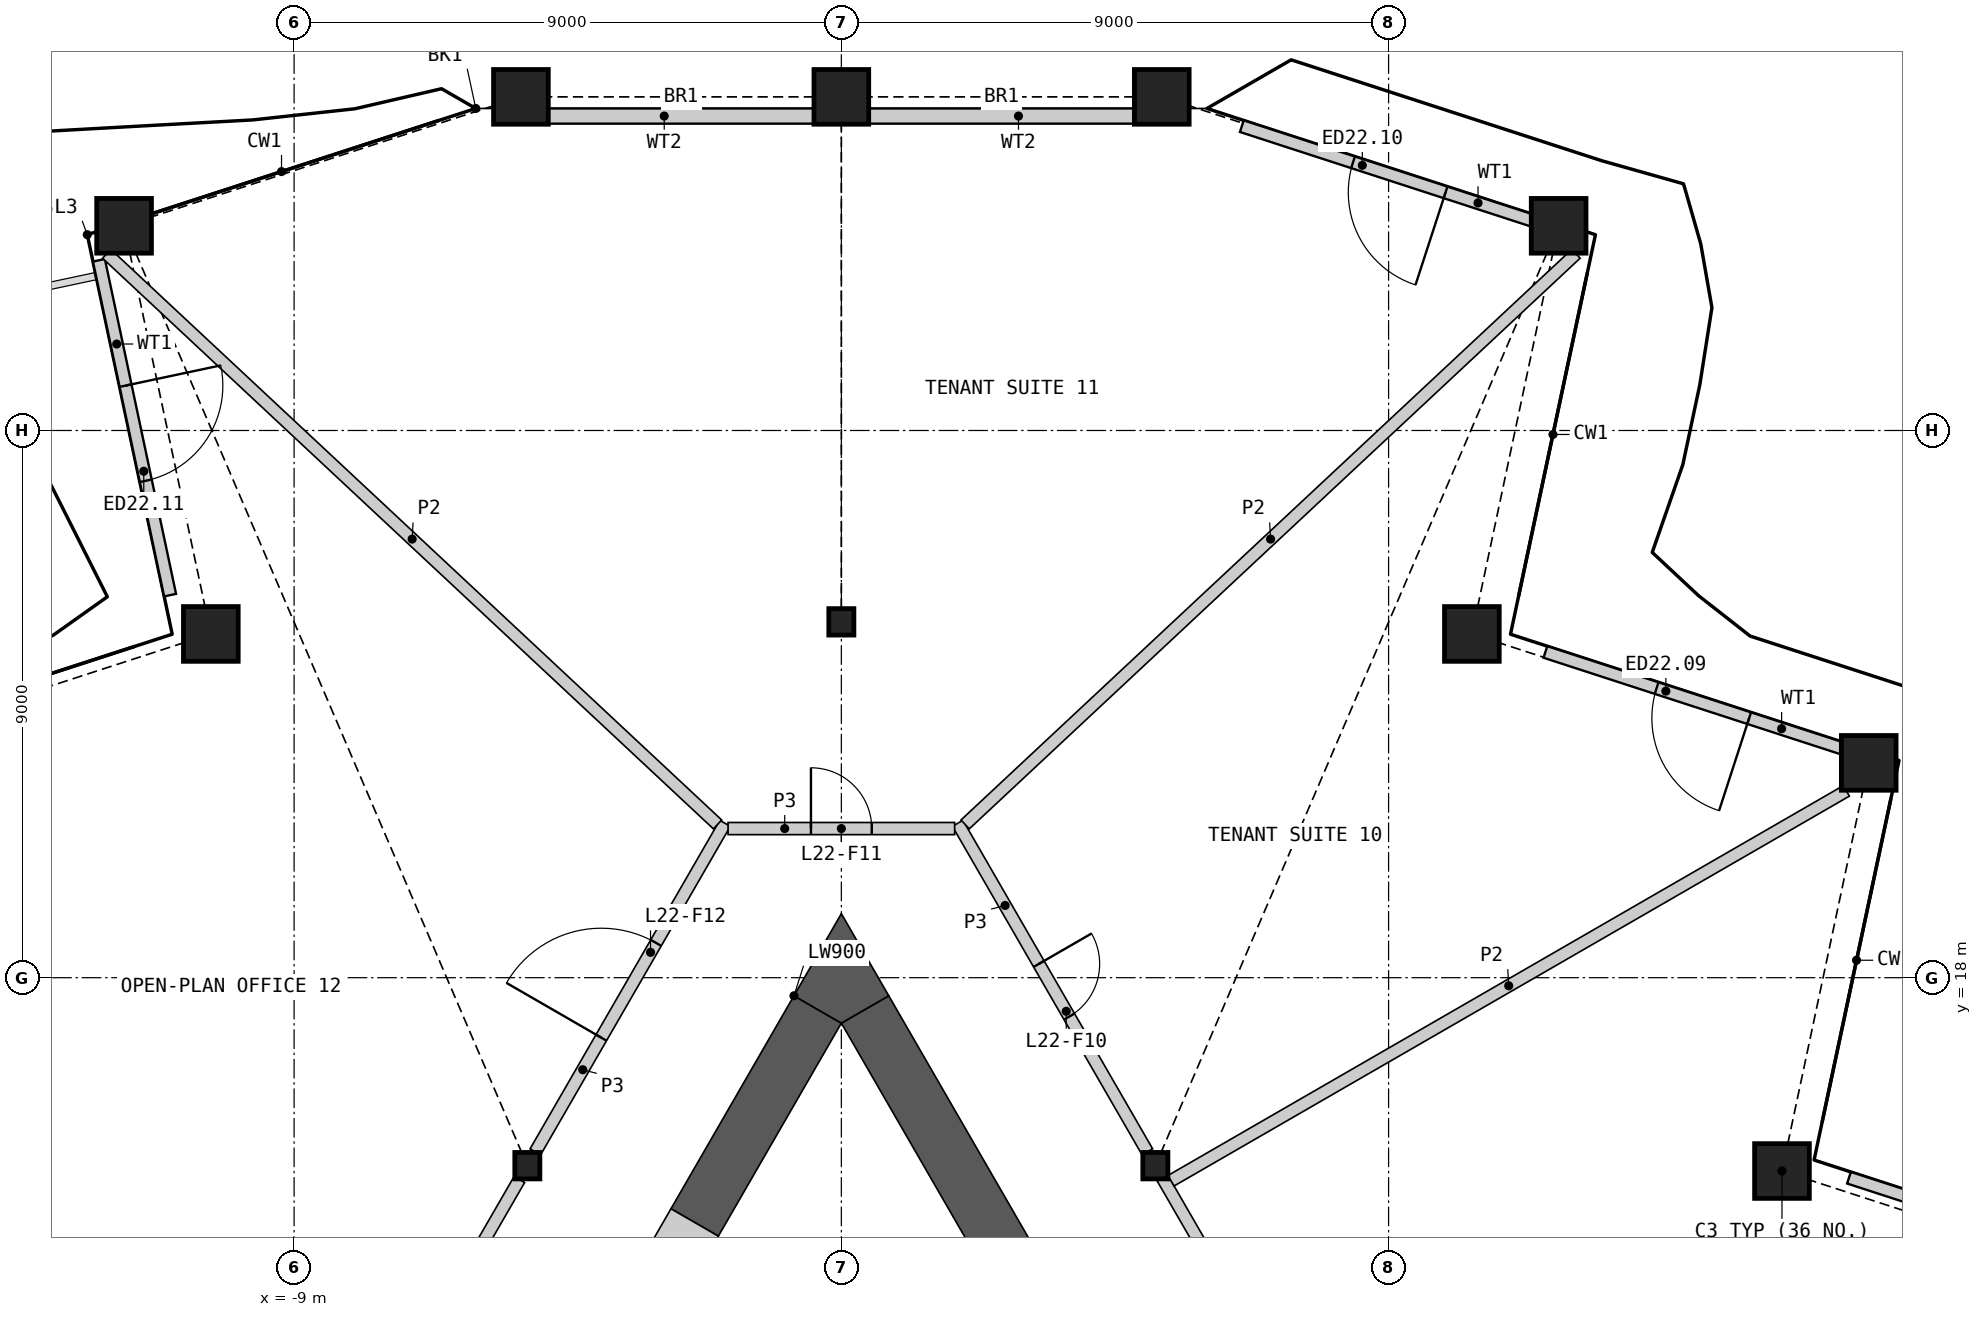
"""IFC4 building model, lengths in metres.
Left out: names, types, materials, properties, quantities, classifications, styles, units other than length and angle.
Written with IfcOpenShell. Run it as: python <this file> out.ifc"""

import sys

from ifc_helpers import new_model, si_unit, direction, frame, frame_2d, origin, origin_2d, place, context, subcontext, project, spatial, polyline, rectangle, hollow_rectangle, i_section, outline, extrude, element, fill, save


model = new_model("IFC4")
c1 = context("Model", 3, precision=1e-05, world=origin(), true_north=direction((0.0, 1.0)))
c2 = subcontext(c1, "Body", "Model", "MODEL_VIEW")
j1 = project(units=[si_unit("LENGTHUNIT", "METRE"), si_unit("PLANEANGLEUNIT", "RADIAN")], contexts=[c1])
p1 = place(None, origin())
s1 = spatial("IfcSite", under=j1, at=p1, CompositionType="ELEMENT")
p2 = place(p1, origin())
s2 = spatial("IfcBuilding", under=s1, at=p2, CompositionType="ELEMENT")
p3 = place(p2, frame((0.0, 0.0, 108.0)))
s3 = spatial("IfcBuildingStorey", under=s2, at=p3, CompositionType="ELEMENT", Elevation=108.0)
for number, where, z_axis, x_axis in (
    (1, (15.469, 14.82, 0.0), (0.0, 0.0, 1.0), (1.0, 0.0, 0.0)),
    (2, (16.896, 21.533, 0.0), (0.0, 0.0, 1.0), (1.0, 0.0, 0.0)),
    (3, (10.37, 23.654, 0.0), (0.0, 0.0, 1.0), (1.0, 0.0, 0.0)),
    (4, (11.796, 30.366, 0.0), (0.0, 0.0, 1.0), (1.0, 0.0, 0.0)),
    (5, (5.27, 32.487, 0.0), (0.0, 0.0, 1.0), (1.0, 0.0, 0.0)),
    (6, (0.0, 32.487, 0.0), (0.0, 0.0, 1.0), (1.0, 0.0, 0.0)),
    (7, (-5.27, 32.487, 0.0), (0.0, 0.0, 1.0), (1.0, 0.0, 0.0)),
    (8, (-11.796, 30.366, 0.0), (0.0, 0.0, 1.0), (1.0, 0.0, 0.0)),
    (9, (-10.37, 23.654, 0.0), (0.0, 0.0, 1.0), (1.0, 0.0, 0.0)),
):
    element("IfcColumn", number, at=place(p3, frame(where, z_axis=z_axis, x_axis=x_axis)), inside=s3, PredefinedType="COLUMN", context=c2, shape_type="SweptSolid", body=[
        extrude(hollow_rectangle(XDim=0.9, YDim=0.9, WallThickness=0.06, at=origin_2d()), origin(), (0.0, 0.0, 1.0), 4.2),
    ])
for number, where, z_axis, x_axis in (
    (10, (0.0, 23.853, 0.0), (0.0, 0.0, 1.0), (1.0, 0.0, 0.0)),
    (11, (-5.164, 14.908, 0.0), (0.0, 0.0, 1.0), (1.0, 0.0, 0.0)),
    (12, (5.164, 14.908, 0.0), (0.0, 0.0, 1.0), (1.0, 0.0, 0.0)),
):
    element("IfcColumn", number, at=place(p3, frame(where, z_axis=z_axis, x_axis=x_axis)), inside=s3, PredefinedType="COLUMN", context=c2, shape_type="SweptSolid", body=[
        extrude(i_section(OverallWidth=0.412, OverallDepth=0.435, WebThickness=0.036, FlangeThickness=0.057, at=origin_2d()), origin(), (0.0, 0.0, 1.0), 4.2),
    ])
p4 = place(p3, frame((21.751, 13.027, 0.0), z_axis=(0.0, 0.0, 1.0), x_axis=(-0.951049879841, 0.309037418534, 0.0)))
e13 = element("IfcWall", 13, at=p4, inside=s3, PredefinedType="SOLIDWALL", context=c2, shape_type="SweptSolid", body=[
    extrude(rectangle(XDim=5.446, YDim=0.2, at=frame_2d((2.723, 0.0))), origin(), (0.0, 0.0, 1.0), 3.189),
])
p5 = place(p4, frame((1.923, 0.0, 0.0)))
e14 = element("IfcOpeningElement", 14, at=p5, cuts=e13, PredefinedType="OPENING", context=c2, shape_type="SweptSolid", body=[
    extrude(rectangle(XDim=1.6, YDim=2.4, at=frame_2d((0.8, 1.2))), frame((0.0, 0.11, 0.0), z_axis=(0.0, -1.0, 0.0), x_axis=(1.0, 0.0, 0.0)), (0.0, 0.0, 1.0), 0.22),
])
p6 = place(p3, frame((16.759, 21.674, 0.0), z_axis=(0.0, 0.0, 1.0), x_axis=(-0.951049879841, 0.309037418534, 0.0)))
e15 = element("IfcWall", 15, at=p6, inside=s3, PredefinedType="SOLIDWALL", context=c2, shape_type="SweptSolid", body=[
    extrude(rectangle(XDim=5.446, YDim=0.2, at=frame_2d((2.723, 0.0))), origin(), (0.0, 0.0, 1.0), 3.189),
])
p7 = place(p6, frame((1.923, 0.0, 0.0)))
e16 = element("IfcOpeningElement", 16, at=p7, cuts=e15, PredefinedType="OPENING", context=c2, shape_type="SweptSolid", body=[
    extrude(rectangle(XDim=1.6, YDim=2.4, at=frame_2d((0.8, 1.2))), frame((0.0, 0.11, 0.0), z_axis=(0.0, -1.0, 0.0), x_axis=(1.0, 0.0, 0.0)), (0.0, 0.0, 1.0), 0.22),
])
p8 = place(p3, frame((11.766, 30.322, 0.0), z_axis=(0.0, 0.0, 1.0), x_axis=(-0.951049879841, 0.309037418534, 0.0)))
e17 = element("IfcWall", 17, at=p8, inside=s3, PredefinedType="SOLIDWALL", context=c2, shape_type="SweptSolid", body=[
    extrude(rectangle(XDim=5.446, YDim=0.2, at=frame_2d((2.723, 0.0))), origin(), (0.0, 0.0, 1.0), 3.189),
])
p9 = place(p8, frame((1.923, 0.0, 0.0)))
e18 = element("IfcOpeningElement", 18, at=p9, cuts=e17, PredefinedType="OPENING", context=c2, shape_type="SweptSolid", body=[
    extrude(rectangle(XDim=1.6, YDim=2.4, at=frame_2d((0.8, 1.2))), frame((0.0, 0.11, 0.0), z_axis=(0.0, -1.0, 0.0), x_axis=(1.0, 0.0, 0.0)), (0.0, 0.0, 1.0), 0.22),
])
for number, where, z_axis, x_axis in (
    (19, (5.376, 32.171, 0.0), (0.0, 0.0, 1.0), (-1.0, 0.0, 0.0)),
    (20, (-0.45, 32.171, 0.0), (0.0, 0.0, 1.0), (-1.0, 0.0, 0.0)),
):
    element("IfcWall", number, at=place(p3, frame(where, z_axis=z_axis, x_axis=x_axis)), inside=s3, PredefinedType="SOLIDWALL", context=c2, shape_type="SweptSolid", body=[
        extrude(rectangle(XDim=4.926, YDim=0.25, at=frame_2d((2.463, 0.0))), origin(), (0.0, 0.0, 1.0), 3.189),
    ])
p10 = place(p3, frame((-12.21, 29.799, 0.0), z_axis=(0.0, 0.0, 1.0), x_axis=(0.207917875772, -0.978146286061, 0.0)))
e21 = element("IfcWall", 21, at=p10, inside=s3, PredefinedType="SOLIDWALL", context=c2, shape_type="SweptSolid", body=[
    extrude(rectangle(XDim=5.63, YDim=0.2, at=frame_2d((2.815, 0.0))), origin(), (0.0, 0.0, 1.0), 3.189),
])
p11 = place(p10, frame((2.107, 0.0, 0.0)))
e22 = element("IfcOpeningElement", 22, at=p11, cuts=e21, PredefinedType="OPENING", context=c2, shape_type="SweptSolid", body=[
    extrude(rectangle(XDim=1.6, YDim=2.4, at=frame_2d((0.8, 1.2))), frame((0.0, 0.11, 0.0), z_axis=(0.0, -1.0, 0.0), x_axis=(1.0, 0.0, 0.0)), (0.0, 0.0, 1.0), 0.22),
])
p12 = place(p3, frame((4.296, 10.712, 0.0), z_axis=(0.0, 0.0, 1.0), x_axis=(-0.500011000363, 0.866019052629, 0.0)))
e23 = element("IfcWall", 23, at=p12, inside=s3, PredefinedType="SHEAR", context=c2, shape_type="SweptSolid", body=[
    extrude(rectangle(XDim=7.812, YDim=0.9, at=frame_2d((3.906, 0.0))), origin(), (0.0, 0.0, 1.0), 3.8),
])
p13 = place(p3, frame((-0.39, 17.478, 0.0), z_axis=(0.0, 0.0, 1.0), x_axis=(-0.500046330384, -0.865998653272, 0.0)))
e24 = element("IfcWall", 24, at=p13, inside=s3, PredefinedType="SHEAR", context=c2, shape_type="SweptSolid", body=[
    extrude(rectangle(XDim=4.045, YDim=0.9, at=frame_2d((2.023, 0.0))), origin(), (0.0, 0.0, 1.0), 3.8),
])
p14 = place(p3, origin())
e25 = element("IfcWall", 25, at=p14, inside=s3, PredefinedType="SHEAR", context=c2, shape_type="SweptSolid", body=[
    extrude(outline(polyline([(-0.779, 17.703), (0.0, 19.052), (0.779, 17.703), (0.0, 17.253), (-0.779, 17.703)])), origin(), (0.0, 0.0, 1.0), 3.8),
])
p15 = place(p3, frame((-2.413, 13.974, 0.0), z_axis=(0.0, 0.0, 1.0), x_axis=(-0.499946605688, -0.86605622881, 0.0)))
e26 = element("IfcWall", 26, at=p15, inside=s3, PredefinedType="SHEAR", context=c2, shape_type="SweptSolid", body=[
    extrude(rectangle(XDim=2.2, YDim=0.9, at=frame_2d((1.1, 0.0))), origin(), (0.0, 0.0, 1.0), 3.8),
])
p16 = place(p15, frame((0.6, 0.0, 0.0)))
e27 = element("IfcOpeningElement", 27, at=p16, cuts=e26, PredefinedType="OPENING", context=c2, shape_type="SweptSolid", body=[
    extrude(rectangle(XDim=1.0, YDim=2.1, at=frame_2d((0.5, 1.05))), frame((0.0, 0.46, 0.0), z_axis=(0.0, -1.0, 0.0), x_axis=(1.0, 0.0, 0.0)), (0.0, 0.0, 1.0), 0.92),
])
p17 = place(p3, frame((-10.197, 6.19, 0.0), z_axis=(0.0, 0.0, 1.0), x_axis=(0.500012035596, 0.866018454918, 0.0)))
e28 = element("IfcWall", 28, at=p17, inside=s3, PredefinedType="PARTITIONING", context=c2, shape_type="SweptSolid", body=[
    extrude(rectangle(XDim=9.803, YDim=0.2, at=frame_2d((4.902, 0.0))), origin(), (0.0, 0.0, 1.0), 3.8),
])
p18 = place(p3, frame((5.281, 14.706, 0.0), z_axis=(0.0, 0.0, 1.0), x_axis=(0.500000421045, -0.866025160694, 0.0)))
e29 = element("IfcWall", 29, at=p18, inside=s3, PredefinedType="PARTITIONING", context=c2, shape_type="SweptSolid", body=[
    extrude(rectangle(XDim=9.833, YDim=0.2, at=frame_2d((4.917, 0.0))), origin(), (0.0, 0.0, 1.0), 3.8),
])
p19 = place(p18, frame((4.467, 0.0, 0.0)))
e30 = element("IfcOpeningElement", 30, at=p19, cuts=e29, PredefinedType="OPENING", context=c2, shape_type="SweptSolid", body=[
    extrude(rectangle(XDim=1.0, YDim=2.1, at=frame_2d((0.5, 1.05))), frame((0.0, 0.11, 0.0), z_axis=(0.0, -1.0, 0.0), x_axis=(1.0, 0.0, 0.0)), (0.0, 0.0, 1.0), 0.22),
])
p20 = place(p3, frame((-5.033, 15.135, 0.0), z_axis=(0.0, 0.0, 1.0), x_axis=(0.499980978912, 0.866036385336, 0.0)))
e31 = element("IfcWall", 31, at=p20, inside=s3, PredefinedType="PARTITIONING", context=c2, shape_type="SweptSolid", body=[
    extrude(rectangle(XDim=6.24, YDim=0.2, at=frame_2d((3.12, 0.0))), origin(), (0.0, 0.0, 1.0), 3.8),
])
p21 = place(p20, frame((2.169, 0.0, 0.0)))
e32 = element("IfcOpeningElement", 32, at=p21, cuts=e31, PredefinedType="OPENING", context=c2, shape_type="SweptSolid", body=[
    extrude(rectangle(XDim=1.8, YDim=2.1, at=frame_2d((0.9, 1.05))), frame((0.0, 0.11, 0.0), z_axis=(0.0, -1.0, 0.0), x_axis=(1.0, 0.0, 0.0)), (0.0, 0.0, 1.0), 0.22),
])
p22 = place(p3, frame((1.913, 20.539, 0.0), z_axis=(0.0, 0.0, 1.0), x_axis=(0.499980978912, -0.866036385336, 0.0)))
e33 = element("IfcWall", 33, at=p22, inside=s3, PredefinedType="PARTITIONING", context=c2, shape_type="SweptSolid", body=[
    extrude(rectangle(XDim=6.24, YDim=0.2, at=frame_2d((3.12, 0.0))), origin(), (0.0, 0.0, 1.0), 3.8),
])
p23 = place(p22, frame((2.67, 0.0, 0.0)))
e34 = element("IfcOpeningElement", 34, at=p23, cuts=e33, PredefinedType="OPENING", context=c2, shape_type="SweptSolid", body=[
    extrude(rectangle(XDim=1.0, YDim=2.1, at=frame_2d((0.5, 1.05))), frame((0.0, 0.11, 0.0), z_axis=(0.0, -1.0, 0.0), x_axis=(1.0, 0.0, 0.0)), (0.0, 0.0, 1.0), 0.22),
])
p24 = place(p3, frame((-1.863, 20.453, 0.0), z_axis=(0.0, 0.0, 1.0), x_axis=(1.0, 0.0, 0.0)))
e35 = element("IfcWall", 35, at=p24, inside=s3, PredefinedType="PARTITIONING", context=c2, shape_type="SweptSolid", body=[
    extrude(rectangle(XDim=3.726, YDim=0.2, at=frame_2d((1.863, 0.0))), origin(), (0.0, 0.0, 1.0), 3.8),
])
p25 = place(p24, frame((1.363, 0.0, 0.0)))
e36 = element("IfcOpeningElement", 36, at=p25, cuts=e35, PredefinedType="OPENING", context=c2, shape_type="SweptSolid", body=[
    extrude(rectangle(XDim=1.0, YDim=2.1, at=frame_2d((0.5, 1.05))), frame((0.0, 0.11, 0.0), z_axis=(0.0, -1.0, 0.0), x_axis=(1.0, 0.0, 0.0)), (0.0, 0.0, 1.0), 0.22),
])
for number, where, z_axis, x_axis in (
    (37, (2.036, 20.521, 0.0), (0.0, 0.0, 1.0), (0.731, 0.683, 0.0)),
    (38, (-12.082, 29.906, 0.0), (0.0, 0.0, 1.0), (0.731, -0.683, 0.0)),
):
    element("IfcWall", number, at=place(p3, frame(where, z_axis=z_axis, x_axis=x_axis)), inside=s3, PredefinedType="PARTITIONING", context=c2, shape_type="SweptSolid", body=[
        extrude(rectangle(XDim=13.748, YDim=0.2, at=frame_2d((6.874, 0.0))), origin(), (0.0, 0.0, 1.0), 2.885),
    ])
p26 = place(p3, frame((5.422, 14.661, 0.0), z_axis=(0.0, 0.0, 1.0), x_axis=(0.866023907196, 0.500002592159, 0.0)))
e39 = element("IfcWall", 39, at=p26, inside=s3, PredefinedType="PARTITIONING", context=c2, shape_type="SweptSolid", body=[
    extrude(rectangle(XDim=12.825, YDim=0.2, at=frame_2d((6.412, 0.0))), origin(), (0.0, 0.0, 1.0), 2.885),
])
p27 = place(p3, frame((-15.01, 14.431, 0.0), z_axis=(0.0, 0.0, 1.0), x_axis=(0.866019738461, -0.5000098125, 0.0)))
e40 = element("IfcWall", 40, at=p27, inside=s3, PredefinedType="PARTITIONING", context=c2, shape_type="SweptSolid", body=[
    extrude(rectangle(XDim=8.188, YDim=0.2, at=frame_2d((4.094, 0.0))), origin(), (0.0, 0.0, 1.0), 2.885),
])
p28 = place(p7, origin())
e41 = element("IfcDoor", 41, at=p28, inside=s3, OperationType="DOUBLE_DOOR_SINGLE_SWING", PredefinedType="DOOR", context=c2, shape_type="SweptSolid", body=[
    extrude(rectangle(XDim=1.6, YDim=2.4, at=frame_2d((0.8, 1.2))), frame((0.0, 0.025, 0.0), z_axis=(0.0, -1.0, 0.0), x_axis=(1.0, 0.0, 0.0)), (0.0, 0.0, 1.0), 0.05),
])
fill(e16, e41)
p29 = place(p9, origin())
e42 = element("IfcDoor", 42, at=p29, inside=s3, OperationType="DOUBLE_DOOR_SINGLE_SWING", PredefinedType="DOOR", context=c2, shape_type="SweptSolid", body=[
    extrude(rectangle(XDim=1.6, YDim=2.4, at=frame_2d((0.8, 1.2))), frame((0.0, 0.025, 0.0), z_axis=(0.0, -1.0, 0.0), x_axis=(1.0, 0.0, 0.0)), (0.0, 0.0, 1.0), 0.05),
])
fill(e18, e42)
p30 = place(p11, origin())
e43 = element("IfcDoor", 43, at=p30, inside=s3, OperationType="DOUBLE_DOOR_SINGLE_SWING", PredefinedType="DOOR", context=c2, shape_type="SweptSolid", body=[
    extrude(rectangle(XDim=1.6, YDim=2.4, at=frame_2d((0.8, 1.2))), frame((0.0, 0.025, 0.0), z_axis=(0.0, -1.0, 0.0), x_axis=(1.0, 0.0, 0.0)), (0.0, 0.0, 1.0), 0.05),
])
fill(e22, e43)
p31 = place(p23, origin())
e44 = element("IfcDoor", 44, at=p31, inside=s3, OperationType="SINGLE_SWING_LEFT", PredefinedType="DOOR", context=c2, shape_type="SweptSolid", body=[
    extrude(rectangle(XDim=1.0, YDim=2.1, at=frame_2d((0.5, 1.05))), frame((0.0, 0.025, 0.0), z_axis=(0.0, -1.0, 0.0), x_axis=(1.0, 0.0, 0.0)), (0.0, 0.0, 1.0), 0.05),
])
fill(e34, e44)
p32 = place(p25, origin())
e45 = element("IfcDoor", 45, at=p32, inside=s3, OperationType="SINGLE_SWING_LEFT", PredefinedType="DOOR", context=c2, shape_type="SweptSolid", body=[
    extrude(rectangle(XDim=1.0, YDim=2.1, at=frame_2d((0.5, 1.05))), frame((0.0, 0.025, 0.0), z_axis=(0.0, -1.0, 0.0), x_axis=(1.0, 0.0, 0.0)), (0.0, 0.0, 1.0), 0.05),
])
fill(e36, e45)
p33 = place(p21, origin())
e46 = element("IfcDoor", 46, at=p33, inside=s3, OperationType="DOUBLE_DOOR_SINGLE_SWING", PredefinedType="DOOR", context=c2, shape_type="SweptSolid", body=[
    extrude(rectangle(XDim=1.8, YDim=2.1, at=frame_2d((0.9, 1.05))), frame((0.0, 0.025, 0.0), z_axis=(0.0, -1.0, 0.0), x_axis=(1.0, 0.0, 0.0)), (0.0, 0.0, 1.0), 0.05),
])
fill(e32, e46)
save(model, sys.argv[1])
